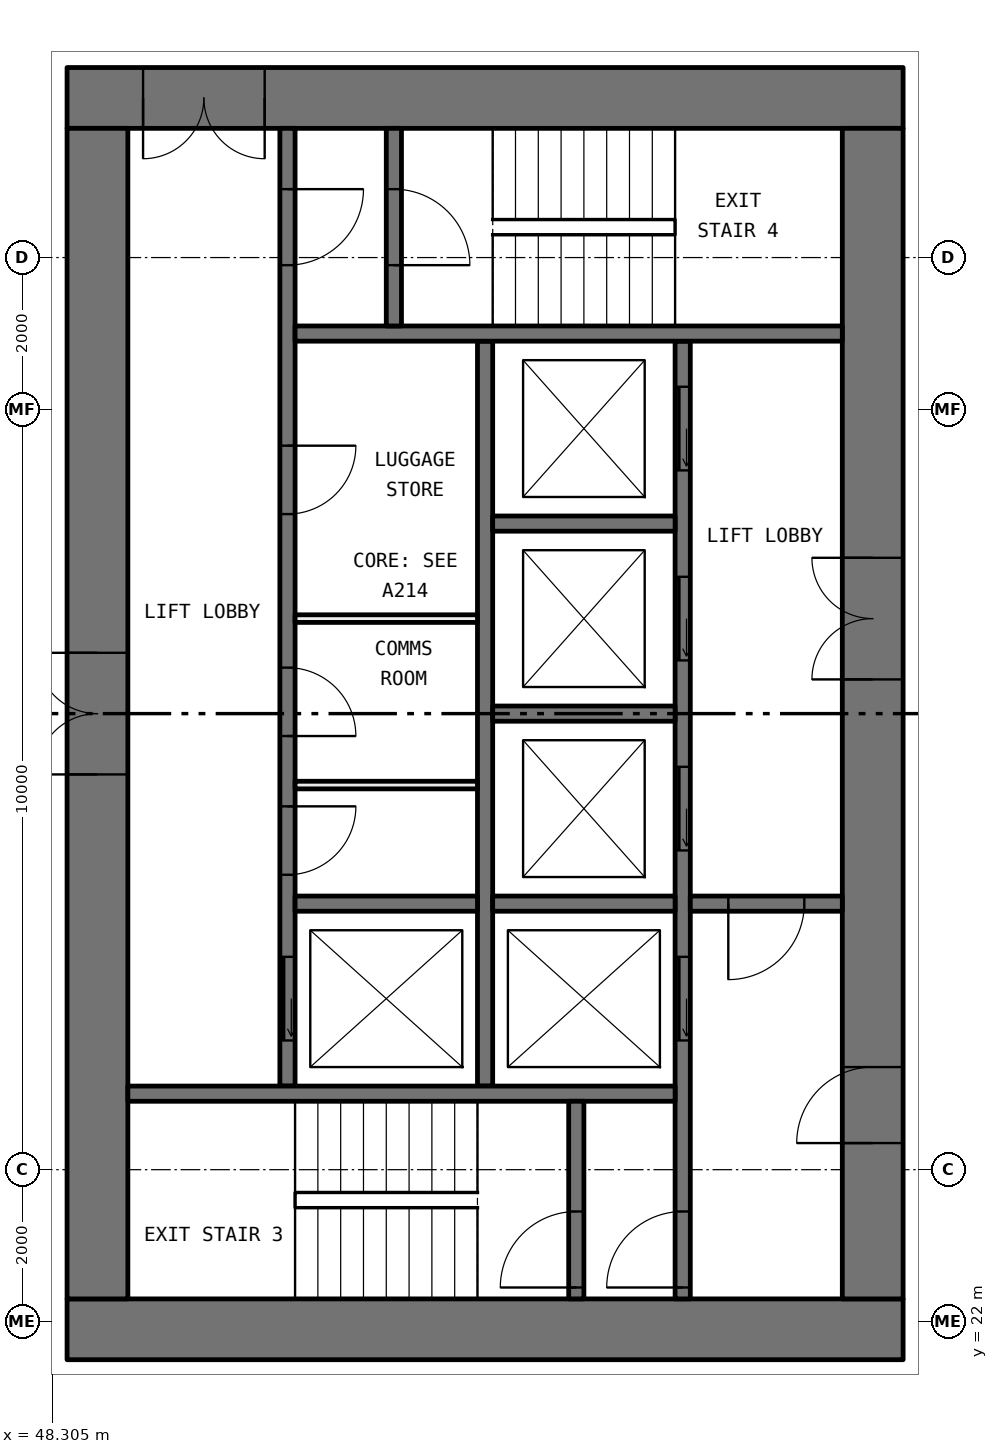
"""IFC4 building model, lengths in metres.
Left out: names, types, materials, properties, quantities, classifications, styles, units other than length and angle.
Written with IfcOpenShell. Run it as: python <this file> out.ifc"""

import sys

from ifc_helpers import new_model, si_unit, direction, frame, frame_2d, origin, place, context, subcontext, project, spatial, rectangle, extrude, element, fill, save


model = new_model("IFC4")
c1 = context("Model", 3, precision=1e-05, world=origin(), true_north=direction((0.0, 1.0)))
c2 = subcontext(c1, "Body", "Model", "MODEL_VIEW")
j1 = project(units=[si_unit("LENGTHUNIT", "METRE"), si_unit("PLANEANGLEUNIT", "RADIAN")], contexts=[c1])
p1 = place(None, origin())
s1 = spatial("IfcSite", under=j1, at=p1, CompositionType="ELEMENT")
p2 = place(p1, origin())
s2 = spatial("IfcBuilding", under=s1, at=p2, CompositionType="ELEMENT")
p3 = place(p2, frame((0.0, 0.0, 57.6)))
s3 = spatial("IfcBuildingStorey", under=s2, at=p3, CompositionType="ELEMENT", Elevation=57.6)
p4 = place(p3, frame((59.5, 21.9, 0.0), z_axis=(0.0, 0.0, 1.0), x_axis=(-1.0, 0.0, 0.0)))
e1 = element("IfcWall", 1, at=p4, inside=s3, PredefinedType="SHEAR", context=c2, shape_type="SweptSolid", body=[
    extrude(rectangle(XDim=11.0, YDim=0.8, at=frame_2d((5.5, 0.0))), origin(), (0.0, 0.0, 1.0), 3.05),
])
p5 = place(p3, frame((59.5, 38.1, 0.0), z_axis=(0.0, 0.0, 1.0), x_axis=(-1.0, 0.0, 0.0)))
e2 = element("IfcWall", 2, at=p5, inside=s3, PredefinedType="SHEAR", context=c2, shape_type="SweptSolid", body=[
    extrude(rectangle(XDim=11.0, YDim=0.8, at=frame_2d((5.5, 0.0))), origin(), (0.0, 0.0, 1.0), 3.05),
])
p6 = place(p5, frame((8.4, 0.0, 0.0)))
e3 = element("IfcOpeningElement", 3, at=p6, cuts=e2, PredefinedType="OPENING", context=c2, shape_type="SweptSolid", body=[
    extrude(rectangle(XDim=1.6, YDim=2.1, at=frame_2d((0.8, 1.05))), frame((0.0, 0.41, 0.0), z_axis=(0.0, -1.0, 0.0), x_axis=(1.0, 0.0, 0.0)), (0.0, 0.0, 1.0), 0.82),
])
p7 = place(p3, frame((59.1, 22.3, 0.0), z_axis=(0.0, 0.0, 1.0), x_axis=(0.0, 1.0, 0.0)))
e4 = element("IfcWall", 4, at=p7, inside=s3, PredefinedType="SHEAR", context=c2, shape_type="SweptSolid", body=[
    extrude(rectangle(XDim=15.4, YDim=0.8, at=frame_2d((7.7, 0.0))), origin(), (0.0, 0.0, 1.0), 3.05),
])
p8 = place(p7, frame((8.15, 0.0, 0.0)))
e5 = element("IfcOpeningElement", 5, at=p8, cuts=e4, PredefinedType="OPENING", context=c2, shape_type="SweptSolid", body=[
    extrude(rectangle(XDim=1.6, YDim=2.1, at=frame_2d((0.8, 1.05))), frame((0.0, 0.41, 0.0), z_axis=(0.0, -1.0, 0.0), x_axis=(1.0, 0.0, 0.0)), (0.0, 0.0, 1.0), 0.82),
])
p9 = place(p7, frame((2.05, 0.0, 0.0)))
e6 = element("IfcOpeningElement", 6, at=p9, cuts=e4, PredefinedType="OPENING", context=c2, shape_type="SweptSolid", body=[
    extrude(rectangle(XDim=1.0, YDim=2.1, at=frame_2d((0.5, 1.05))), frame((0.0, 0.41, 0.0), z_axis=(0.0, -1.0, 0.0), x_axis=(1.0, 0.0, 0.0)), (0.0, 0.0, 1.0), 0.82),
])
p10 = place(p3, frame((48.9, 22.3, 0.0), z_axis=(0.0, 0.0, 1.0), x_axis=(0.0, 1.0, 0.0)))
e7 = element("IfcWall", 7, at=p10, inside=s3, PredefinedType="SHEAR", context=c2, shape_type="SweptSolid", body=[
    extrude(rectangle(XDim=15.4, YDim=0.8, at=frame_2d((7.7, 0.0))), origin(), (0.0, 0.0, 1.0), 3.05),
])
p11 = place(p10, frame((6.9, 0.0, 0.0)))
e8 = element("IfcOpeningElement", 8, at=p11, cuts=e7, PredefinedType="OPENING", context=c2, shape_type="SweptSolid", body=[
    extrude(rectangle(XDim=1.6, YDim=2.1, at=frame_2d((0.8, 1.05))), frame((0.0, 0.41, 0.0), z_axis=(0.0, -1.0, 0.0), x_axis=(1.0, 0.0, 0.0)), (0.0, 0.0, 1.0), 0.82),
])
p12 = place(p3, frame((56.6, 22.3, 0.0), z_axis=(0.0, 0.0, 1.0), x_axis=(0.0, 1.0, 0.0)))
e9 = element("IfcWall", 9, at=p12, inside=s3, PredefinedType="SOLIDWALL", context=c2, shape_type="SweptSolid", body=[
    extrude(rectangle(XDim=12.6, YDim=0.2, at=frame_2d((6.3, 0.0))), origin(), (0.0, 0.0, 1.0), 3.05),
])
p13 = place(p12, frame((3.4, 0.0, 0.0)))
e10 = element("IfcOpeningElement", 10, at=p13, cuts=e9, PredefinedType="OPENING", context=c2, shape_type="SweptSolid", body=[
    extrude(rectangle(XDim=1.1, YDim=2.1, at=frame_2d((0.55, 1.05))), frame((0.0, 0.11, 0.0), z_axis=(0.0, -1.0, 0.0), x_axis=(1.0, 0.0, 0.0)), (0.0, 0.0, 1.0), 0.22),
])
p14 = place(p12, frame((5.9, 0.0, 0.0)))
e11 = element("IfcOpeningElement", 11, at=p14, cuts=e9, PredefinedType="OPENING", context=c2, shape_type="SweptSolid", body=[
    extrude(rectangle(XDim=1.1, YDim=2.1, at=frame_2d((0.55, 1.05))), frame((0.0, 0.11, 0.0), z_axis=(0.0, -1.0, 0.0), x_axis=(1.0, 0.0, 0.0)), (0.0, 0.0, 1.0), 0.22),
])
p15 = place(p12, frame((8.4, 0.0, 0.0)))
e12 = element("IfcOpeningElement", 12, at=p15, cuts=e9, PredefinedType="OPENING", context=c2, shape_type="SweptSolid", body=[
    extrude(rectangle(XDim=1.1, YDim=2.1, at=frame_2d((0.55, 1.05))), frame((0.0, 0.11, 0.0), z_axis=(0.0, -1.0, 0.0), x_axis=(1.0, 0.0, 0.0)), (0.0, 0.0, 1.0), 0.22),
])
p16 = place(p12, frame((10.9, 0.0, 0.0)))
e13 = element("IfcOpeningElement", 13, at=p16, cuts=e9, PredefinedType="OPENING", context=c2, shape_type="SweptSolid", body=[
    extrude(rectangle(XDim=1.1, YDim=2.1, at=frame_2d((0.55, 1.05))), frame((0.0, 0.11, 0.0), z_axis=(0.0, -1.0, 0.0), x_axis=(1.0, 0.0, 0.0)), (0.0, 0.0, 1.0), 0.22),
])
p17 = place(p12, frame((0.15, 0.0, 0.0)))
e14 = element("IfcOpeningElement", 14, at=p17, cuts=e9, PredefinedType="OPENING", context=c2, shape_type="SweptSolid", body=[
    extrude(rectangle(XDim=1.0, YDim=2.1, at=frame_2d((0.5, 1.05))), frame((0.0, 0.11, 0.0), z_axis=(0.0, -1.0, 0.0), x_axis=(1.0, 0.0, 0.0)), (0.0, 0.0, 1.0), 0.22),
])
p18 = place(p3, frame((51.4, 25.1, 0.0), z_axis=(0.0, 0.0, 1.0), x_axis=(0.0, 1.0, 0.0)))
e15 = element("IfcWall", 15, at=p18, inside=s3, PredefinedType="SOLIDWALL", context=c2, shape_type="SweptSolid", body=[
    extrude(rectangle(XDim=12.6, YDim=0.2, at=frame_2d((6.3, 0.0))), origin(), (0.0, 0.0, 1.0), 3.05),
])
p19 = place(p18, frame((0.6, 0.0, 0.0)))
e16 = element("IfcOpeningElement", 16, at=p19, cuts=e15, PredefinedType="OPENING", context=c2, shape_type="SweptSolid", body=[
    extrude(rectangle(XDim=1.1, YDim=2.1, at=frame_2d((0.55, 1.05))), frame((0.0, 0.11, 0.0), z_axis=(0.0, -1.0, 0.0), x_axis=(1.0, 0.0, 0.0)), (0.0, 0.0, 1.0), 0.22),
])
p20 = place(p18, frame((10.8, 0.0, 0.0)))
e17 = element("IfcOpeningElement", 17, at=p20, cuts=e15, PredefinedType="OPENING", context=c2, shape_type="SweptSolid", body=[
    extrude(rectangle(XDim=1.0, YDim=2.1, at=frame_2d((0.5, 1.05))), frame((0.0, 0.11, 0.0), z_axis=(0.0, -1.0, 0.0), x_axis=(1.0, 0.0, 0.0)), (0.0, 0.0, 1.0), 0.22),
])
p21 = place(p18, frame((2.78, 0.0, 0.0)))
e18 = element("IfcOpeningElement", 18, at=p21, cuts=e15, PredefinedType="OPENING", context=c2, shape_type="SweptSolid", body=[
    extrude(rectangle(XDim=0.9, YDim=2.1, at=frame_2d((0.45, 1.05))), frame((0.0, 0.11, 0.0), z_axis=(0.0, -1.0, 0.0), x_axis=(1.0, 0.0, 0.0)), (0.0, 0.0, 1.0), 0.22),
])
p22 = place(p18, frame((4.605, 0.0, 0.0)))
e19 = element("IfcOpeningElement", 19, at=p22, cuts=e15, PredefinedType="OPENING", context=c2, shape_type="SweptSolid", body=[
    extrude(rectangle(XDim=0.9, YDim=2.1, at=frame_2d((0.45, 1.05))), frame((0.0, 0.11, 0.0), z_axis=(0.0, -1.0, 0.0), x_axis=(1.0, 0.0, 0.0)), (0.0, 0.0, 1.0), 0.22),
])
p23 = place(p18, frame((7.525, 0.0, 0.0)))
e20 = element("IfcOpeningElement", 20, at=p23, cuts=e15, PredefinedType="OPENING", context=c2, shape_type="SweptSolid", body=[
    extrude(rectangle(XDim=0.9, YDim=2.1, at=frame_2d((0.45, 1.05))), frame((0.0, 0.11, 0.0), z_axis=(0.0, -1.0, 0.0), x_axis=(1.0, 0.0, 0.0)), (0.0, 0.0, 1.0), 0.22),
])
p24 = place(p3, frame((54.0, 25.1, 0.0), z_axis=(0.0, 0.0, 1.0), x_axis=(0.0, 1.0, 0.0)))
e21 = element("IfcWall", 21, at=p24, inside=s3, PredefinedType="SOLIDWALL", context=c2, shape_type="SweptSolid", body=[
    extrude(rectangle(XDim=9.8, YDim=0.2, at=frame_2d((4.9, 0.0))), origin(), (0.0, 0.0, 1.0), 3.05),
])
for number, where, z_axis, x_axis in (
    (22, (56.5, 25.0, 0.0), (0.0, 0.0, 1.0), (-1.0, 0.0, 0.0)),
    (23, (58.7, 35.0, 0.0), (0.0, 0.0, 1.0), (-1.0, 0.0, 0.0)),
):
    element("IfcWall", number, at=place(p3, frame(where, z_axis=z_axis, x_axis=x_axis)), inside=s3, PredefinedType="SOLIDWALL", context=c2, shape_type="SweptSolid", body=[
        extrude(rectangle(XDim=7.2, YDim=0.2, at=frame_2d((3.6, 0.0))), origin(), (0.0, 0.0, 1.0), 3.05),
    ])
p25 = place(p3, frame((58.7, 27.5, 0.0), z_axis=(0.0, 0.0, 1.0), x_axis=(-1.0, 0.0, 0.0)))
e24 = element("IfcWall", 24, at=p25, inside=s3, PredefinedType="SOLIDWALL", context=c2, shape_type="SweptSolid", body=[
    extrude(rectangle(XDim=2.0, YDim=0.2, at=frame_2d((1.0, 0.0))), origin(), (0.0, 0.0, 1.0), 3.05),
])
p26 = place(p25, frame((0.5, 0.0, 0.0)))
e25 = element("IfcOpeningElement", 25, at=p26, cuts=e24, PredefinedType="OPENING", context=c2, shape_type="SweptSolid", body=[
    extrude(rectangle(XDim=1.0, YDim=2.1, at=frame_2d((0.5, 1.05))), frame((0.0, 0.11, 0.0), z_axis=(0.0, -1.0, 0.0), x_axis=(1.0, 0.0, 0.0)), (0.0, 0.0, 1.0), 0.22),
])
p27 = place(p3, frame((55.2, 22.3, 0.0), z_axis=(0.0, 0.0, 1.0), x_axis=(0.0, 1.0, 0.0)))
e26 = element("IfcWall", 26, at=p27, inside=s3, PredefinedType="SOLIDWALL", context=c2, shape_type="SweptSolid", body=[
    extrude(rectangle(XDim=2.6, YDim=0.2, at=frame_2d((1.3, 0.0))), origin(), (0.0, 0.0, 1.0), 3.05),
])
p28 = place(p27, frame((0.15, 0.0, 0.0)))
e27 = element("IfcOpeningElement", 27, at=p28, cuts=e26, PredefinedType="OPENING", context=c2, shape_type="SweptSolid", body=[
    extrude(rectangle(XDim=1.0, YDim=2.1, at=frame_2d((0.5, 1.05))), frame((0.0, 0.11, 0.0), z_axis=(0.0, -1.0, 0.0), x_axis=(1.0, 0.0, 0.0)), (0.0, 0.0, 1.0), 0.22),
])
p29 = place(p3, frame((52.8, 35.1, 0.0), z_axis=(0.0, 0.0, 1.0), x_axis=(0.0, 1.0, 0.0)))
e28 = element("IfcWall", 28, at=p29, inside=s3, PredefinedType="SOLIDWALL", context=c2, shape_type="SweptSolid", body=[
    extrude(rectangle(XDim=2.6, YDim=0.2, at=frame_2d((1.3, 0.0))), origin(), (0.0, 0.0, 1.0), 3.05),
])
p30 = place(p29, frame((0.8, 0.0, 0.0)))
e29 = element("IfcOpeningElement", 29, at=p30, cuts=e28, PredefinedType="OPENING", context=c2, shape_type="SweptSolid", body=[
    extrude(rectangle(XDim=1.0, YDim=2.1, at=frame_2d((0.5, 1.05))), frame((0.0, 0.11, 0.0), z_axis=(0.0, -1.0, 0.0), x_axis=(1.0, 0.0, 0.0)), (0.0, 0.0, 1.0), 0.22),
])
for number, where, z_axis, x_axis in (
    (30, (56.5, 27.5, 0.0), (0.0, 0.0, 1.0), (-1.0, 0.0, 0.0)),
    (31, (56.5, 30.0, 0.0), (0.0, 0.0, 1.0), (-1.0, 0.0, 0.0)),
    (32, (56.5, 32.5, 0.0), (0.0, 0.0, 1.0), (-1.0, 0.0, 0.0)),
    (33, (53.9, 27.5, 0.0), (0.0, 0.0, 1.0), (-1.0, 0.0, 0.0)),
):
    element("IfcWall", number, at=place(p3, frame(where, z_axis=z_axis, x_axis=x_axis)), inside=s3, PredefinedType="SOLIDWALL", context=c2, shape_type="SweptSolid", body=[
        extrude(rectangle(XDim=2.4, YDim=0.2, at=frame_2d((1.2, 0.0))), origin(), (0.0, 0.0, 1.0), 3.05),
    ])
for number, where, z_axis, x_axis in (
    (34, (53.9, 29.06, 0.0), (0.0, 0.0, 1.0), (-1.0, 0.0, 0.0)),
    (35, (53.9, 31.25, 0.0), (0.0, 0.0, 1.0), (-1.0, 0.0, 0.0)),
):
    element("IfcWall", number, at=place(p3, frame(where, z_axis=z_axis, x_axis=x_axis)), inside=s3, PredefinedType="PARTITIONING", context=c2, shape_type="SweptSolid", body=[
        extrude(rectangle(XDim=2.4, YDim=0.1, at=frame_2d((1.2, 0.0))), origin(), (0.0, 0.0, 1.0), 3.05),
    ])
p31 = place(p19, origin())
e36 = element("IfcDoor", 36, at=p31, inside=s3, OperationType="SLIDING_TO_LEFT", PredefinedType="DOOR", context=c2, shape_type="SweptSolid", body=[
    extrude(rectangle(XDim=1.1, YDim=2.1, at=frame_2d((0.55, 1.05))), frame((0.0, 0.025, 0.0), z_axis=(0.0, -1.0, 0.0), x_axis=(1.0, 0.0, 0.0)), (0.0, 0.0, 1.0), 0.05),
])
fill(e16, e36)
p32 = place(p13, origin())
e37 = element("IfcDoor", 37, at=p32, inside=s3, OperationType="SLIDING_TO_LEFT", PredefinedType="DOOR", context=c2, shape_type="SweptSolid", body=[
    extrude(rectangle(XDim=1.1, YDim=2.1, at=frame_2d((0.55, 1.05))), frame((0.0, 0.025, 0.0), z_axis=(0.0, -1.0, 0.0), x_axis=(1.0, 0.0, 0.0)), (0.0, 0.0, 1.0), 0.05),
])
fill(e10, e37)
p33 = place(p14, origin())
e38 = element("IfcDoor", 38, at=p33, inside=s3, OperationType="SLIDING_TO_LEFT", PredefinedType="DOOR", context=c2, shape_type="SweptSolid", body=[
    extrude(rectangle(XDim=1.1, YDim=2.1, at=frame_2d((0.55, 1.05))), frame((0.0, 0.025, 0.0), z_axis=(0.0, -1.0, 0.0), x_axis=(1.0, 0.0, 0.0)), (0.0, 0.0, 1.0), 0.05),
])
fill(e11, e38)
p34 = place(p15, origin())
e39 = element("IfcDoor", 39, at=p34, inside=s3, OperationType="SLIDING_TO_LEFT", PredefinedType="DOOR", context=c2, shape_type="SweptSolid", body=[
    extrude(rectangle(XDim=1.1, YDim=2.1, at=frame_2d((0.55, 1.05))), frame((0.0, 0.025, 0.0), z_axis=(0.0, -1.0, 0.0), x_axis=(1.0, 0.0, 0.0)), (0.0, 0.0, 1.0), 0.05),
])
fill(e12, e39)
p35 = place(p16, origin())
e40 = element("IfcDoor", 40, at=p35, inside=s3, OperationType="SLIDING_TO_LEFT", PredefinedType="DOOR", context=c2, shape_type="SweptSolid", body=[
    extrude(rectangle(XDim=1.1, YDim=2.1, at=frame_2d((0.55, 1.05))), frame((0.0, 0.025, 0.0), z_axis=(0.0, -1.0, 0.0), x_axis=(1.0, 0.0, 0.0)), (0.0, 0.0, 1.0), 0.05),
])
fill(e13, e40)
p36 = place(p28, origin())
e41 = element("IfcDoor", 41, at=p36, inside=s3, OperationType="SINGLE_SWING_RIGHT", PredefinedType="DOOR", context=c2, shape_type="SweptSolid", body=[
    extrude(rectangle(XDim=1.0, YDim=2.1, at=frame_2d((0.5, 1.05))), frame((0.0, 0.025, 0.0), z_axis=(0.0, -1.0, 0.0), x_axis=(1.0, 0.0, 0.0)), (0.0, 0.0, 1.0), 0.05),
])
fill(e27, e41)
p37 = place(p17, origin())
e42 = element("IfcDoor", 42, at=p37, inside=s3, OperationType="SINGLE_SWING_RIGHT", PredefinedType="DOOR", context=c2, shape_type="SweptSolid", body=[
    extrude(rectangle(XDim=1.0, YDim=2.1, at=frame_2d((0.5, 1.05))), frame((0.0, 0.025, 0.0), z_axis=(0.0, -1.0, 0.0), x_axis=(1.0, 0.0, 0.0)), (0.0, 0.0, 1.0), 0.05),
])
fill(e14, e42)
p38 = place(p20, frame((1.0, 0.0, 0.0), x_axis=(-1.0, 0.0, 0.0)))
e43 = element("IfcDoor", 43, at=p38, inside=s3, OperationType="SINGLE_SWING_RIGHT", PredefinedType="DOOR", context=c2, shape_type="SweptSolid", body=[
    extrude(rectangle(XDim=1.0, YDim=2.1, at=frame_2d((0.5, 1.05))), frame((0.0, 0.025, 0.0), z_axis=(0.0, -1.0, 0.0), x_axis=(1.0, 0.0, 0.0)), (0.0, 0.0, 1.0), 0.05),
])
fill(e17, e43)
p39 = place(p30, frame((1.0, 0.0, 0.0), x_axis=(-1.0, 0.0, 0.0)))
e44 = element("IfcDoor", 44, at=p39, inside=s3, OperationType="SINGLE_SWING_LEFT", PredefinedType="DOOR", context=c2, shape_type="SweptSolid", body=[
    extrude(rectangle(XDim=1.0, YDim=2.1, at=frame_2d((0.5, 1.05))), frame((0.0, 0.025, 0.0), z_axis=(0.0, -1.0, 0.0), x_axis=(1.0, 0.0, 0.0)), (0.0, 0.0, 1.0), 0.05),
])
fill(e29, e44)
p40 = place(p26, origin())
e45 = element("IfcDoor", 45, at=p40, inside=s3, OperationType="SINGLE_SWING_LEFT", PredefinedType="DOOR", context=c2, shape_type="SweptSolid", body=[
    extrude(rectangle(XDim=1.0, YDim=2.1, at=frame_2d((0.5, 1.05))), frame((0.0, 0.025, 0.0), z_axis=(0.0, -1.0, 0.0), x_axis=(1.0, 0.0, 0.0)), (0.0, 0.0, 1.0), 0.05),
])
fill(e25, e45)
p41 = place(p8, origin())
e46 = element("IfcDoor", 46, at=p41, inside=s3, OperationType="DOUBLE_DOOR_SINGLE_SWING", PredefinedType="DOOR", context=c2, shape_type="SweptSolid", body=[
    extrude(rectangle(XDim=1.6, YDim=2.1, at=frame_2d((0.8, 1.05))), frame((0.0, 0.025, 0.0), z_axis=(0.0, -1.0, 0.0), x_axis=(1.0, 0.0, 0.0)), (0.0, 0.0, 1.0), 0.05),
])
fill(e5, e46)
p42 = place(p9, origin())
e47 = element("IfcDoor", 47, at=p42, inside=s3, OperationType="SINGLE_SWING_RIGHT", PredefinedType="DOOR", context=c2, shape_type="SweptSolid", body=[
    extrude(rectangle(XDim=1.0, YDim=2.1, at=frame_2d((0.5, 1.05))), frame((0.0, 0.025, 0.0), z_axis=(0.0, -1.0, 0.0), x_axis=(1.0, 0.0, 0.0)), (0.0, 0.0, 1.0), 0.05),
])
fill(e6, e47)
p43 = place(p6, origin())
e48 = element("IfcDoor", 48, at=p43, inside=s3, OperationType="DOUBLE_DOOR_SINGLE_SWING", PredefinedType="DOOR", context=c2, shape_type="SweptSolid", body=[
    extrude(rectangle(XDim=1.6, YDim=2.1, at=frame_2d((0.8, 1.05))), frame((0.0, 0.025, 0.0), z_axis=(0.0, -1.0, 0.0), x_axis=(1.0, 0.0, 0.0)), (0.0, 0.0, 1.0), 0.05),
])
fill(e3, e48)
p44 = place(p11, origin())
e49 = element("IfcDoor", 49, at=p44, inside=s3, OperationType="DOUBLE_DOOR_SINGLE_SWING", PredefinedType="DOOR", context=c2, shape_type="SweptSolid", body=[
    extrude(rectangle(XDim=1.6, YDim=2.1, at=frame_2d((0.8, 1.05))), frame((0.0, 0.025, 0.0), z_axis=(0.0, -1.0, 0.0), x_axis=(1.0, 0.0, 0.0)), (0.0, 0.0, 1.0), 0.05),
])
fill(e8, e49)
p45 = place(p21, frame((0.9, 0.0, 0.0), x_axis=(-1.0, 0.0, 0.0)))
e50 = element("IfcDoor", 50, at=p45, inside=s3, OperationType="SINGLE_SWING_RIGHT", PredefinedType="DOOR", context=c2, shape_type="SweptSolid", body=[
    extrude(rectangle(XDim=0.9, YDim=2.1, at=frame_2d((0.45, 1.05))), frame((0.0, 0.025, 0.0), z_axis=(0.0, -1.0, 0.0), x_axis=(1.0, 0.0, 0.0)), (0.0, 0.0, 1.0), 0.05),
])
fill(e18, e50)
p46 = place(p22, frame((0.9, 0.0, 0.0), x_axis=(-1.0, 0.0, 0.0)))
e51 = element("IfcDoor", 51, at=p46, inside=s3, OperationType="SINGLE_SWING_LEFT", PredefinedType="DOOR", context=c2, shape_type="SweptSolid", body=[
    extrude(rectangle(XDim=0.9, YDim=2.1, at=frame_2d((0.45, 1.05))), frame((0.0, 0.025, 0.0), z_axis=(0.0, -1.0, 0.0), x_axis=(1.0, 0.0, 0.0)), (0.0, 0.0, 1.0), 0.05),
])
fill(e19, e51)
p47 = place(p23, frame((0.9, 0.0, 0.0), x_axis=(-1.0, 0.0, 0.0)))
e52 = element("IfcDoor", 52, at=p47, inside=s3, OperationType="SINGLE_SWING_RIGHT", PredefinedType="DOOR", context=c2, shape_type="SweptSolid", body=[
    extrude(rectangle(XDim=0.9, YDim=2.1, at=frame_2d((0.45, 1.05))), frame((0.0, 0.025, 0.0), z_axis=(0.0, -1.0, 0.0), x_axis=(1.0, 0.0, 0.0)), (0.0, 0.0, 1.0), 0.05),
])
fill(e20, e52)
save(model, sys.argv[1])
